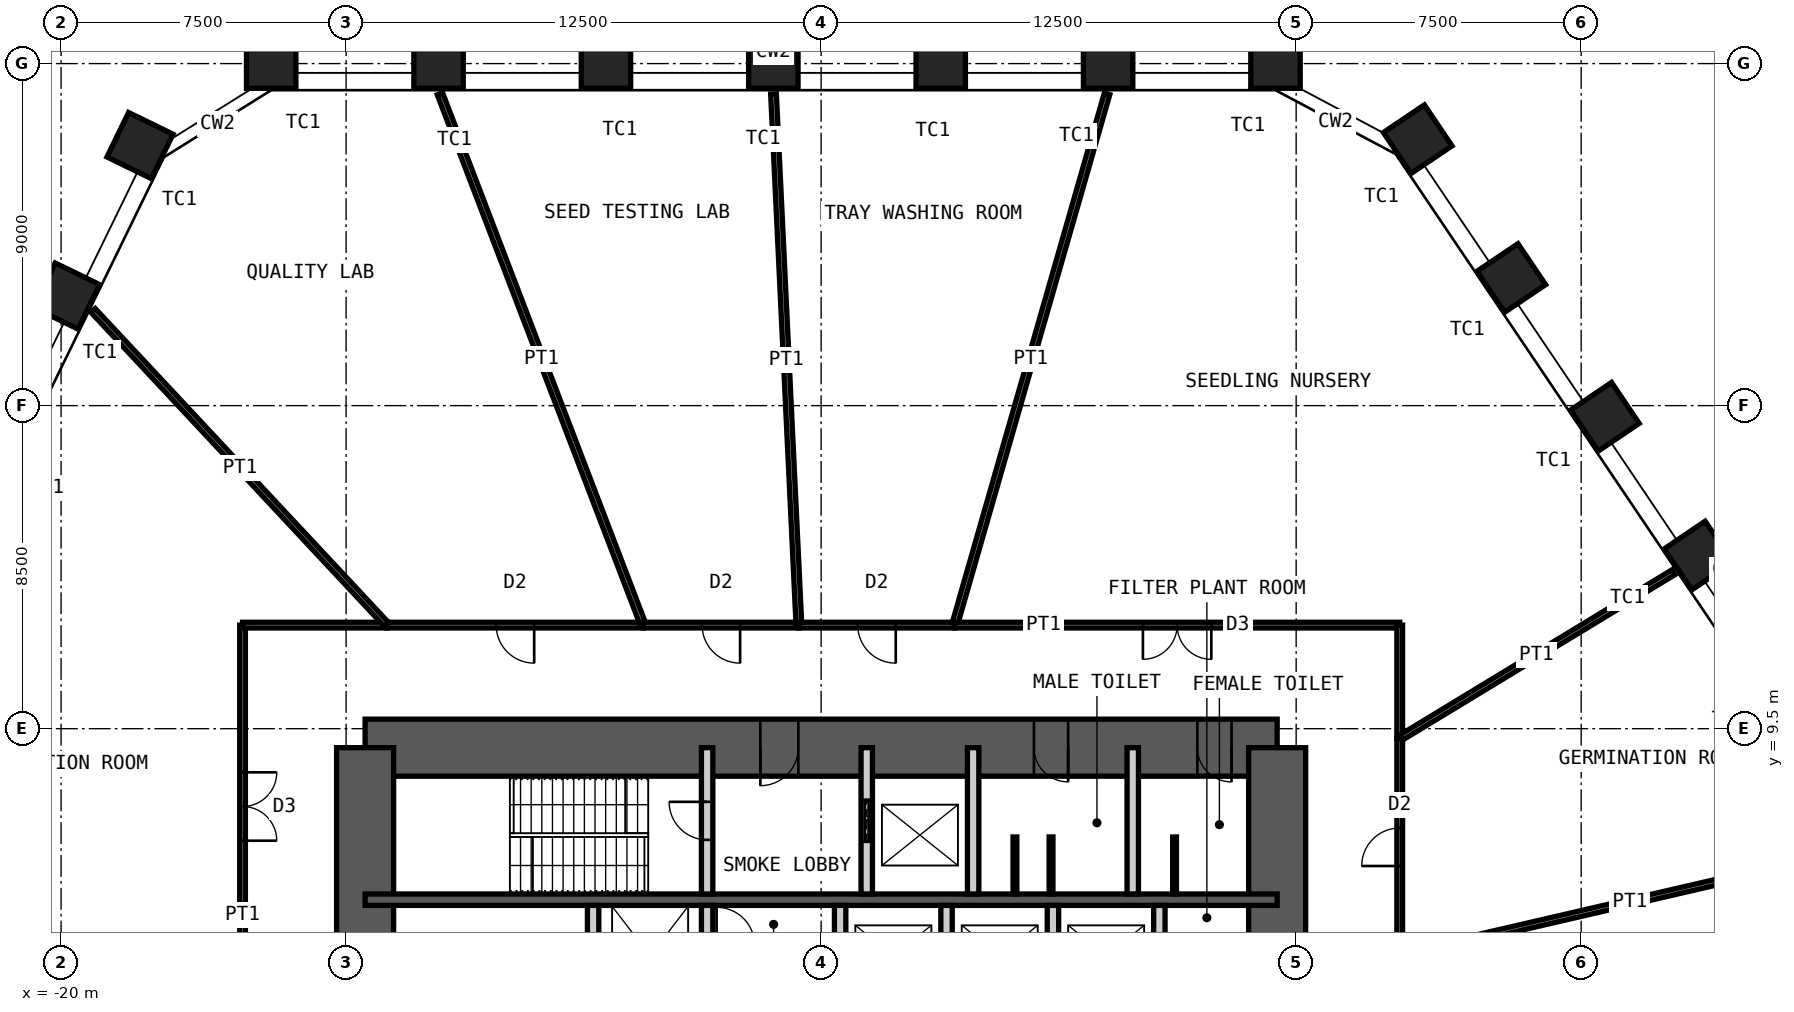
"""IFC4 building model, lengths in metres.
Left out: names, types, materials, properties, quantities, classifications, styles, units other than length and angle.
Written with IfcOpenShell. Run it as: python <this file> out.ifc"""

import sys

from ifc_helpers import new_model, si_unit, direction, frame, frame_2d, origin, origin_2d, place, context, subcontext, project, spatial, rectangle, hollow_rectangle, extrude, element, fill, save


model = new_model("IFC4")
c1 = context("Model", 3, precision=1e-05, world=origin(), true_north=direction((0.0, 1.0)))
c2 = subcontext(c1, "Body", "Model", "MODEL_VIEW")
j1 = project(units=[si_unit("LENGTHUNIT", "METRE"), si_unit("PLANEANGLEUNIT", "RADIAN")], contexts=[c1])
p1 = place(None, origin())
s1 = spatial("IfcSite", under=j1, at=p1, CompositionType="ELEMENT")
p2 = place(p1, origin())
s2 = spatial("IfcBuilding", under=s1, at=p2, CompositionType="ELEMENT")
p3 = place(p2, frame((0.0, 0.0, 27.0)))
s3 = spatial("IfcBuildingStorey", under=s2, at=p3, CompositionType="ELEMENT", Elevation=27.0)
for number, where, z_axis, x_axis in (
    (1, (-14.471, 27.0, 0.0), (0.0, 0.0, 1.0), (-1.0, 0.0, 0.0)),
    (2, (-10.067, 27.0, 0.0), (0.0, 0.0, 1.0), (-1.0, 0.0, 0.0)),
    (3, (-5.662, 27.0, 0.0), (0.0, 0.0, 1.0), (-1.0, 0.0, 0.0)),
    (4, (-1.258, 27.0, 0.0), (0.0, 0.0, 1.0), (-1.0, 0.0, 0.0)),
    (5, (3.147, 27.0, 0.0), (0.0, 0.0, 1.0), (-1.0, 0.0, 0.0)),
    (6, (7.552, 27.0, 0.0), (0.0, 0.0, 1.0), (-1.0, 0.0, 0.0)),
    (7, (11.956, 27.0, 0.0), (0.0, 0.0, 1.0), (-1.0, 0.0, 0.0)),
    (8, (15.698, 25.01, 0.0), (0.0, 0.0, 1.0), (-0.559, 0.829, 0.0)),
    (9, (18.161, 21.359, 0.0), (0.0, 0.0, 1.0), (-0.559, 0.829, 0.0)),
    (10, (20.624, 17.707, 0.0), (0.0, 0.0, 1.0), (-0.559, 0.829, 0.0)),
    (11, (23.087, 14.056, 0.0), (0.0, 0.0, 1.0), (-0.559, 0.829, 0.0)),
    (12, (-19.854, 20.884, 0.0), (0.0, 0.0, 1.0), (-0.438, -0.899, 0.0)),
    (13, (-17.924, 24.843, 0.0), (0.0, 0.0, 1.0), (-0.438, -0.899, 0.0)),
):
    element("IfcColumn", number, at=place(p3, frame(where, z_axis=z_axis, x_axis=x_axis)), inside=s3, PredefinedType="COLUMN", context=c2, shape_type="SweptSolid", body=[
        extrude(hollow_rectangle(XDim=1.3, YDim=1.3, WallThickness=0.1, at=origin_2d()), origin(), (0.0, 0.0, 1.0), 5.0),
    ])
p4 = place(p3, frame((-12.0, 9.0, 0.0), z_axis=(0.0, 0.0, 1.0), x_axis=(1.0, 0.0, 0.0)))
e14 = element("IfcWall", 14, at=p4, inside=s3, PredefinedType="SHEAR", context=c2, shape_type="SweptSolid", body=[
    extrude(rectangle(XDim=24.0, YDim=1.5, at=frame_2d((12.0, 0.0))), origin(), (0.0, 0.0, 1.0), 5.0),
])
p5 = place(p4, frame((10.4, 0.0, 0.0)))
e15 = element("IfcOpeningElement", 15, at=p5, cuts=e14, PredefinedType="OPENING", context=c2, shape_type="SweptSolid", body=[
    extrude(rectangle(XDim=1.0, YDim=2.1, at=frame_2d((0.5, 1.05))), frame((0.0, 0.76, 0.0), z_axis=(0.0, -1.0, 0.0), x_axis=(1.0, 0.0, 0.0)), (0.0, 0.0, 1.0), 1.52),
])
p6 = place(p4, frame((17.6, 0.0, 0.0)))
e16 = element("IfcOpeningElement", 16, at=p6, cuts=e14, PredefinedType="OPENING", context=c2, shape_type="SweptSolid", body=[
    extrude(rectangle(XDim=0.9, YDim=2.1, at=frame_2d((0.45, 1.05))), frame((0.0, 0.76, 0.0), z_axis=(0.0, -1.0, 0.0), x_axis=(1.0, 0.0, 0.0)), (0.0, 0.0, 1.0), 1.52),
])
p7 = place(p4, frame((21.9, 0.0, 0.0)))
e17 = element("IfcOpeningElement", 17, at=p7, cuts=e14, PredefinedType="OPENING", context=c2, shape_type="SweptSolid", body=[
    extrude(rectangle(XDim=0.9, YDim=2.1, at=frame_2d((0.45, 1.05))), frame((0.0, 0.76, 0.0), z_axis=(0.0, -1.0, 0.0), x_axis=(1.0, 0.0, 0.0)), (0.0, 0.0, 1.0), 1.52),
])
p8 = place(p3, frame((12.0, -9.0, 0.0), z_axis=(0.0, 0.0, 1.0), x_axis=(0.0, 1.0, 0.0)))
e18 = element("IfcWall", 18, at=p8, inside=s3, PredefinedType="SHEAR", context=c2, shape_type="SweptSolid", body=[
    extrude(rectangle(XDim=18.0, YDim=1.5, at=frame_2d((9.0, 0.0))), origin(), (0.0, 0.0, 1.0), 5.0),
])
p9 = place(p8, frame((8.1, 0.0, 0.0)))
e19 = element("IfcOpeningElement", 19, at=p9, cuts=e18, PredefinedType="OPENING", context=c2, shape_type="SweptSolid", body=[
    extrude(rectangle(XDim=1.8, YDim=2.1, at=frame_2d((0.9, 1.05))), frame((0.0, 0.76, 0.0), z_axis=(0.0, -1.0, 0.0), x_axis=(1.0, 0.0, 0.0)), (0.0, 0.0, 1.0), 1.52),
])
p10 = place(p3, frame((-12.0, -9.0, 0.0), z_axis=(0.0, 0.0, 1.0), x_axis=(0.0, 1.0, 0.0)))
e20 = element("IfcWall", 20, at=p10, inside=s3, PredefinedType="SHEAR", context=c2, shape_type="SweptSolid", body=[
    extrude(rectangle(XDim=18.0, YDim=1.5, at=frame_2d((9.0, 0.0))), origin(), (0.0, 0.0, 1.0), 5.0),
])
p11 = place(p10, frame((8.1, 0.0, 0.0)))
e21 = element("IfcOpeningElement", 21, at=p11, cuts=e20, PredefinedType="OPENING", context=c2, shape_type="SweptSolid", body=[
    extrude(rectangle(XDim=1.8, YDim=2.1, at=frame_2d((0.9, 1.05))), frame((0.0, 0.76, 0.0), z_axis=(0.0, -1.0, 0.0), x_axis=(1.0, 0.0, 0.0)), (0.0, 0.0, 1.0), 1.52),
])
p12 = place(p3, frame((-12.0, 5.0, 0.0), z_axis=(0.0, 0.0, 1.0), x_axis=(1.0, 0.0, 0.0)))
e22 = element("IfcWall", 22, at=p12, inside=s3, PredefinedType="SHEAR", context=c2, shape_type="SweptSolid", body=[
    extrude(rectangle(XDim=24.0, YDim=0.3, at=frame_2d((12.0, 0.0))), origin(), (0.0, 0.0, 1.0), 5.0),
])
p13 = place(p3, frame((-3.0, 5.15, 0.0), z_axis=(0.0, 0.0, 1.0), x_axis=(0.0, 1.0, 0.0)))
e23 = element("IfcWall", 23, at=p13, inside=s3, PredefinedType="PARTITIONING", context=c2, shape_type="SweptSolid", body=[
    extrude(rectangle(XDim=3.85, YDim=0.3, at=frame_2d((1.925, 0.0))), origin(), (0.0, 0.0, 1.0), 4.78),
])
p14 = place(p13, frame((1.425, 0.0, 0.0)))
e24 = element("IfcOpeningElement", 24, at=p14, cuts=e23, PredefinedType="OPENING", context=c2, shape_type="SweptSolid", body=[
    extrude(rectangle(XDim=1.0, YDim=2.1, at=frame_2d((0.5, 1.05))), frame((0.0, 0.16, 0.0), z_axis=(0.0, -1.0, 0.0), x_axis=(1.0, 0.0, 0.0)), (0.0, 0.0, 1.0), 0.32),
])
p15 = place(p3, frame((1.2, 5.15, 0.0), z_axis=(0.0, 0.0, 1.0), x_axis=(0.0, 1.0, 0.0)))
e25 = element("IfcWall", 25, at=p15, inside=s3, PredefinedType="PARTITIONING", context=c2, shape_type="SweptSolid", body=[
    extrude(rectangle(XDim=3.85, YDim=0.3, at=frame_2d((1.925, 0.0))), origin(), (0.0, 0.0, 1.0), 4.78),
])
p16 = place(p15, frame((1.375, 0.0, 0.0)))
e26 = element("IfcOpeningElement", 26, at=p16, cuts=e25, PredefinedType="OPENING", context=c2, shape_type="SweptSolid", body=[
    extrude(rectangle(XDim=1.1, YDim=2.4, at=frame_2d((0.55, 1.2))), frame((0.0, 0.16, 0.0), z_axis=(0.0, -1.0, 0.0), x_axis=(1.0, 0.0, 0.0)), (0.0, 0.0, 1.0), 0.32),
])
for number, where, z_axis, x_axis in (
    (27, (4.0, 5.15, 0.0), (0.0, 0.0, 1.0), (0.0, 1.0, 0.0)),
    (28, (8.2, 5.15, 0.0), (0.0, 0.0, 1.0), (0.0, 1.0, 0.0)),
):
    element("IfcWall", number, at=place(p3, frame(where, z_axis=z_axis, x_axis=x_axis)), inside=s3, PredefinedType="PARTITIONING", context=c2, shape_type="SweptSolid", body=[
        extrude(rectangle(XDim=3.85, YDim=0.3, at=frame_2d((1.925, 0.0))), origin(), (0.0, 0.0, 1.0), 4.78),
    ])
for number, where, z_axis, x_axis in (
    (29, (-6.0, 2.2, 0.0), (0.0, 0.0, 1.0), (0.0, 1.0, 0.0)),
    (30, (-3.0, 2.2, 0.0), (0.0, 0.0, 1.0), (0.0, 1.0, 0.0)),
    (31, (0.5, 2.2, 0.0), (0.0, 0.0, 1.0), (0.0, 1.0, 0.0)),
    (32, (3.3, 2.2, 0.0), (0.0, 0.0, 1.0), (0.0, 1.0, 0.0)),
    (33, (6.1, 2.2, 0.0), (0.0, 0.0, 1.0), (0.0, 1.0, 0.0)),
    (34, (8.9, 2.2, 0.0), (0.0, 0.0, 1.0), (0.0, 1.0, 0.0)),
):
    element("IfcWall", number, at=place(p3, frame(where, z_axis=z_axis, x_axis=x_axis)), inside=s3, PredefinedType="PARTITIONING", context=c2, shape_type="SweptSolid", body=[
        extrude(rectangle(XDim=2.65, YDim=0.3, at=frame_2d((1.325, 0.0))), origin(), (0.0, 0.0, 1.0), 4.78),
    ])
for number, where, z_axis, x_axis in (
    (35, (5.1, 5.15, 0.0), (0.0, 0.0, 1.0), (0.0, 1.0, 0.0)),
    (36, (6.05, 5.15, 0.0), (0.0, 0.0, 1.0), (0.0, 1.0, 0.0)),
    (37, (9.3, 5.15, 0.0), (0.0, 0.0, 1.0), (0.0, 1.0, 0.0)),
):
    element("IfcWall", number, at=place(p3, frame(where, z_axis=z_axis, x_axis=x_axis)), inside=s3, PredefinedType="PARTITIONING", context=c2, shape_type="SweptSolid", body=[
        extrude(rectangle(XDim=1.5, YDim=0.1, at=frame_2d((0.75, 0.0))), origin(), (0.0, 0.0, 1.0), 2.1),
    ])
p17 = place(p3, frame((7.524, 26.204, 0.0), z_axis=(0.0, 0.0, 1.0), x_axis=(-0.275975790041, -0.961164587004, 0.0)))
e38 = element("IfcWall", 38, at=p17, inside=s3, PredefinedType="PARTITIONING", context=c2, shape_type="SweptSolid", body=[
    extrude(rectangle(XDim=14.543, YDim=0.15, at=frame_2d((7.272, 0.0))), origin(), (0.0, 0.0, 1.0), 3.7),
])
p18 = place(p3, frame((3.51, 12.225, 0.0), z_axis=(0.0, 0.0, 1.0), x_axis=(1.0, 0.0, 0.0)))
e39 = element("IfcWall", 39, at=p18, inside=s3, PredefinedType="PARTITIONING", context=c2, shape_type="SweptSolid", body=[
    extrude(rectangle(XDim=11.715, YDim=0.15, at=frame_2d((5.857, 0.0))), origin(), (0.0, 0.0, 1.0), 4.8),
])
p19 = place(p18, frame((4.958, 0.0, 0.0)))
e40 = element("IfcOpeningElement", 40, at=p19, cuts=e39, PredefinedType="OPENING", context=c2, shape_type="SweptSolid", body=[
    extrude(rectangle(XDim=1.8, YDim=2.4, at=frame_2d((0.9, 1.2))), frame((0.0, 0.085, 0.0), z_axis=(0.0, -1.0, 0.0), x_axis=(1.0, 0.0, 0.0)), (0.0, 0.0, 1.0), 0.17),
])
p20 = place(p3, frame((15.225, 12.225, 0.0), z_axis=(0.0, 0.0, 1.0), x_axis=(0.0, -1.0, 0.0)))
e41 = element("IfcWall", 41, at=p20, inside=s3, PredefinedType="PARTITIONING", context=c2, shape_type="SweptSolid", body=[
    extrude(rectangle(XDim=2.982, YDim=0.15, at=frame_2d((1.491, 0.0))), origin(), (0.0, 0.0, 1.0), 4.8),
])
p21 = place(p3, frame((22.421, 13.612, 0.0), z_axis=(0.0, 0.0, 1.0), x_axis=(-0.854789353023, -0.518975107263, 0.0)))
e42 = element("IfcWall", 42, at=p21, inside=s3, PredefinedType="PARTITIONING", context=c2, shape_type="SweptSolid", body=[
    extrude(rectangle(XDim=8.419, YDim=0.15, at=frame_2d((4.209, 0.0))), origin(), (0.0, 0.0, 1.0), 3.7),
])
p22 = place(p3, frame((15.225, 9.243, 0.0), z_axis=(0.0, 0.0, 1.0), x_axis=(0.0, -1.0, 0.0)))
e43 = element("IfcWall", 43, at=p22, inside=s3, PredefinedType="PARTITIONING", context=c2, shape_type="SweptSolid", body=[
    extrude(rectangle(XDim=5.713, YDim=0.15, at=frame_2d((2.856, 0.0))), origin(), (0.0, 0.0, 1.0), 4.8),
])
p23 = place(p22, frame((2.356, 0.0, 0.0)))
e44 = element("IfcOpeningElement", 44, at=p23, cuts=e43, PredefinedType="OPENING", context=c2, shape_type="SweptSolid", body=[
    extrude(rectangle(XDim=1.0, YDim=2.4, at=frame_2d((0.5, 1.2))), frame((0.0, 0.085, 0.0), z_axis=(0.0, -1.0, 0.0), x_axis=(1.0, 0.0, 0.0)), (0.0, 0.0, 1.0), 0.17),
])
p24 = place(p3, frame((27.336, 6.338, 0.0), z_axis=(0.0, 0.0, 1.0), x_axis=(-0.974155334075, -0.225879138243, 0.0)))
e45 = element("IfcWall", 45, at=p24, inside=s3, PredefinedType="PARTITIONING", context=c2, shape_type="SweptSolid", body=[
    extrude(rectangle(XDim=12.432, YDim=0.15, at=frame_2d((6.216, 0.0))), origin(), (0.0, 0.0, 1.0), 3.7),
])
p25 = place(p3, frame((-26.85, 4.725, 0.0), z_axis=(0.0, 0.0, 1.0), x_axis=(0.984867773441, -0.173307440223, 0.0)))
e46 = element("IfcWall", 46, at=p25, inside=s3, PredefinedType="PARTITIONING", context=c2, shape_type="SweptSolid", body=[
    extrude(rectangle(XDim=11.804, YDim=0.15, at=frame_2d((5.902, 0.0))), origin(), (0.0, 0.0, 1.0), 3.7),
])
p26 = place(p3, frame((-15.225, 2.679, 0.0), z_axis=(0.0, 0.0, 1.0), x_axis=(0.0, 1.0, 0.0)))
e47 = element("IfcWall", 47, at=p26, inside=s3, PredefinedType="PARTITIONING", context=c2, shape_type="SweptSolid", body=[
    extrude(rectangle(XDim=9.546, YDim=0.15, at=frame_2d((4.773, 0.0))), origin(), (0.0, 0.0, 1.0), 4.8),
])
p27 = place(p26, frame((3.873, 0.0, 0.0)))
e48 = element("IfcOpeningElement", 48, at=p27, cuts=e47, PredefinedType="OPENING", context=c2, shape_type="SweptSolid", body=[
    extrude(rectangle(XDim=1.8, YDim=2.4, at=frame_2d((0.9, 1.2))), frame((0.0, 0.085, 0.0), z_axis=(0.0, -1.0, 0.0), x_axis=(1.0, 0.0, 0.0)), (0.0, 0.0, 1.0), 0.17),
])
p28 = place(p3, frame((-15.225, 12.225, 0.0), z_axis=(0.0, 0.0, 1.0), x_axis=(1.0, 0.0, 0.0)))
e49 = element("IfcWall", 49, at=p28, inside=s3, PredefinedType="PARTITIONING", context=c2, shape_type="SweptSolid", body=[
    extrude(rectangle(XDim=3.803, YDim=0.15, at=frame_2d((1.902, 0.0))), origin(), (0.0, 0.0, 1.0), 4.8),
])
p29 = place(p3, frame((-19.157, 20.504, 0.0), z_axis=(0.0, 0.0, 1.0), x_axis=(0.682695116082, -0.730703345057, 0.0)))
e50 = element("IfcWall", 50, at=p29, inside=s3, PredefinedType="PARTITIONING", context=c2, shape_type="SweptSolid", body=[
    extrude(rectangle(XDim=11.33, YDim=0.15, at=frame_2d((5.665, 0.0))), origin(), (0.0, 0.0, 1.0), 3.7),
])
p30 = place(p3, frame((-11.422, 12.225, 0.0), z_axis=(0.0, 0.0, 1.0), x_axis=(1.0, 0.0, 0.0)))
e51 = element("IfcWall", 51, at=p30, inside=s3, PredefinedType="PARTITIONING", context=c2, shape_type="SweptSolid", body=[
    extrude(rectangle(XDim=6.742, YDim=0.15, at=frame_2d((3.371, 0.0))), origin(), (0.0, 0.0, 1.0), 4.8),
])
p31 = place(p30, frame((2.871, 0.0, 0.0)))
e52 = element("IfcOpeningElement", 52, at=p31, cuts=e51, PredefinedType="OPENING", context=c2, shape_type="SweptSolid", body=[
    extrude(rectangle(XDim=1.0, YDim=2.4, at=frame_2d((0.5, 1.2))), frame((0.0, 0.085, 0.0), z_axis=(0.0, -1.0, 0.0), x_axis=(1.0, 0.0, 0.0)), (0.0, 0.0, 1.0), 0.17),
])
p32 = place(p3, frame((-10.031, 26.207, 0.0), z_axis=(0.0, 0.0, 1.0), x_axis=(0.357470544466, -0.933924413344, 0.0)))
e53 = element("IfcWall", 53, at=p32, inside=s3, PredefinedType="PARTITIONING", context=c2, shape_type="SweptSolid", body=[
    extrude(rectangle(XDim=14.971, YDim=0.15, at=frame_2d((7.485, 0.0))), origin(), (0.0, 0.0, 1.0), 3.7),
])
p33 = place(p3, frame((-4.679, 12.225, 0.0), z_axis=(0.0, 0.0, 1.0), x_axis=(1.0, 0.0, 0.0)))
e54 = element("IfcWall", 54, at=p33, inside=s3, PredefinedType="PARTITIONING", context=c2, shape_type="SweptSolid", body=[
    extrude(rectangle(XDim=4.095, YDim=0.15, at=frame_2d((2.047, 0.0))), origin(), (0.0, 0.0, 1.0), 4.8),
])
p34 = place(p33, frame((1.547, 0.0, 0.0)))
e55 = element("IfcOpeningElement", 55, at=p34, cuts=e54, PredefinedType="OPENING", context=c2, shape_type="SweptSolid", body=[
    extrude(rectangle(XDim=1.0, YDim=2.4, at=frame_2d((0.5, 1.2))), frame((0.0, 0.085, 0.0), z_axis=(0.0, -1.0, 0.0), x_axis=(1.0, 0.0, 0.0)), (0.0, 0.0, 1.0), 0.17),
])
p35 = place(p3, frame((-1.253, 26.2, 0.0), z_axis=(0.0, 0.0, 1.0), x_axis=(0.047759977782, -0.998858841139, 0.0)))
e56 = element("IfcWall", 56, at=p35, inside=s3, PredefinedType="PARTITIONING", context=c2, shape_type="SweptSolid", body=[
    extrude(rectangle(XDim=13.991, YDim=0.15, at=frame_2d((6.996, 0.0))), origin(), (0.0, 0.0, 1.0), 3.7),
])
p36 = place(p3, frame((-0.585, 12.225, 0.0), z_axis=(0.0, 0.0, 1.0), x_axis=(1.0, 0.0, 0.0)))
e57 = element("IfcWall", 57, at=p36, inside=s3, PredefinedType="PARTITIONING", context=c2, shape_type="SweptSolid", body=[
    extrude(rectangle(XDim=4.095, YDim=0.15, at=frame_2d((2.047, 0.0))), origin(), (0.0, 0.0, 1.0), 4.8),
])
p37 = place(p36, frame((1.547, 0.0, 0.0)))
e58 = element("IfcOpeningElement", 58, at=p37, cuts=e57, PredefinedType="OPENING", context=c2, shape_type="SweptSolid", body=[
    extrude(rectangle(XDim=1.0, YDim=2.4, at=frame_2d((0.5, 1.2))), frame((0.0, 0.085, 0.0), z_axis=(0.0, -1.0, 0.0), x_axis=(1.0, 0.0, 0.0)), (0.0, 0.0, 1.0), 0.17),
])
p38 = place(p5, origin())
e59 = element("IfcDoor", 59, at=p38, inside=s3, OperationType="SINGLE_SWING_LEFT", PredefinedType="DOOR", context=c2, shape_type="SweptSolid", body=[
    extrude(rectangle(XDim=1.0, YDim=2.1, at=frame_2d((0.5, 1.05))), frame((0.0, 0.025, 0.0), z_axis=(0.0, -1.0, 0.0), x_axis=(1.0, 0.0, 0.0)), (0.0, 0.0, 1.0), 0.05),
])
fill(e15, e59)
p39 = place(p6, origin())
e60 = element("IfcDoor", 60, at=p39, inside=s3, OperationType="SINGLE_SWING_RIGHT", PredefinedType="DOOR", context=c2, shape_type="SweptSolid", body=[
    extrude(rectangle(XDim=0.9, YDim=2.1, at=frame_2d((0.45, 1.05))), frame((0.0, 0.025, 0.0), z_axis=(0.0, -1.0, 0.0), x_axis=(1.0, 0.0, 0.0)), (0.0, 0.0, 1.0), 0.05),
])
fill(e16, e60)
p40 = place(p7, origin())
e61 = element("IfcDoor", 61, at=p40, inside=s3, OperationType="SINGLE_SWING_RIGHT", PredefinedType="DOOR", context=c2, shape_type="SweptSolid", body=[
    extrude(rectangle(XDim=0.9, YDim=2.1, at=frame_2d((0.45, 1.05))), frame((0.0, 0.025, 0.0), z_axis=(0.0, -1.0, 0.0), x_axis=(1.0, 0.0, 0.0)), (0.0, 0.0, 1.0), 0.05),
])
fill(e17, e61)
p41 = place(p14, origin())
e62 = element("IfcDoor", 62, at=p41, inside=s3, OperationType="SINGLE_SWING_LEFT", PredefinedType="DOOR", context=c2, shape_type="SweptSolid", body=[
    extrude(rectangle(XDim=1.0, YDim=2.1, at=frame_2d((0.5, 1.05))), frame((0.0, 0.025, 0.0), z_axis=(0.0, -1.0, 0.0), x_axis=(1.0, 0.0, 0.0)), (0.0, 0.0, 1.0), 0.05),
])
fill(e24, e62)
p42 = place(p16, origin())
e63 = element("IfcDoor", 63, at=p42, inside=s3, OperationType="DOUBLE_DOOR_SLIDING", PredefinedType="DOOR", context=c2, shape_type="SweptSolid", body=[
    extrude(rectangle(XDim=1.1, YDim=2.4, at=frame_2d((0.55, 1.2))), frame((0.0, 0.025, 0.0), z_axis=(0.0, -1.0, 0.0), x_axis=(1.0, 0.0, 0.0)), (0.0, 0.0, 1.0), 0.05),
])
fill(e26, e63)
p43 = place(p19, origin())
e64 = element("IfcDoor", 64, at=p43, inside=s3, OperationType="DOUBLE_DOOR_DOUBLE_SWING", PredefinedType="DOOR", context=c2, shape_type="SweptSolid", body=[
    extrude(rectangle(XDim=1.8, YDim=2.4, at=frame_2d((0.9, 1.2))), frame((0.0, 0.025, 0.0), z_axis=(0.0, -1.0, 0.0), x_axis=(1.0, 0.0, 0.0)), (0.0, 0.0, 1.0), 0.05),
])
fill(e40, e64)
p44 = place(p23, origin())
e65 = element("IfcDoor", 65, at=p44, inside=s3, OperationType="SINGLE_SWING_RIGHT", PredefinedType="DOOR", context=c2, shape_type="SweptSolid", body=[
    extrude(rectangle(XDim=1.0, YDim=2.4, at=frame_2d((0.5, 1.2))), frame((0.0, 0.025, 0.0), z_axis=(0.0, -1.0, 0.0), x_axis=(1.0, 0.0, 0.0)), (0.0, 0.0, 1.0), 0.05),
])
fill(e44, e65)
p45 = place(p27, origin())
e66 = element("IfcDoor", 66, at=p45, inside=s3, OperationType="DOUBLE_DOOR_DOUBLE_SWING", PredefinedType="DOOR", context=c2, shape_type="SweptSolid", body=[
    extrude(rectangle(XDim=1.8, YDim=2.4, at=frame_2d((0.9, 1.2))), frame((0.0, 0.025, 0.0), z_axis=(0.0, -1.0, 0.0), x_axis=(1.0, 0.0, 0.0)), (0.0, 0.0, 1.0), 0.05),
])
fill(e48, e66)
p46 = place(p31, origin())
e67 = element("IfcDoor", 67, at=p46, inside=s3, OperationType="SINGLE_SWING_RIGHT", PredefinedType="DOOR", context=c2, shape_type="SweptSolid", body=[
    extrude(rectangle(XDim=1.0, YDim=2.4, at=frame_2d((0.5, 1.2))), frame((0.0, 0.025, 0.0), z_axis=(0.0, -1.0, 0.0), x_axis=(1.0, 0.0, 0.0)), (0.0, 0.0, 1.0), 0.05),
])
fill(e52, e67)
p47 = place(p34, origin())
e68 = element("IfcDoor", 68, at=p47, inside=s3, OperationType="SINGLE_SWING_RIGHT", PredefinedType="DOOR", context=c2, shape_type="SweptSolid", body=[
    extrude(rectangle(XDim=1.0, YDim=2.4, at=frame_2d((0.5, 1.2))), frame((0.0, 0.025, 0.0), z_axis=(0.0, -1.0, 0.0), x_axis=(1.0, 0.0, 0.0)), (0.0, 0.0, 1.0), 0.05),
])
fill(e55, e68)
p48 = place(p37, origin())
e69 = element("IfcDoor", 69, at=p48, inside=s3, OperationType="SINGLE_SWING_RIGHT", PredefinedType="DOOR", context=c2, shape_type="SweptSolid", body=[
    extrude(rectangle(XDim=1.0, YDim=2.4, at=frame_2d((0.5, 1.2))), frame((0.0, 0.025, 0.0), z_axis=(0.0, -1.0, 0.0), x_axis=(1.0, 0.0, 0.0)), (0.0, 0.0, 1.0), 0.05),
])
fill(e58, e69)
save(model, sys.argv[1])
